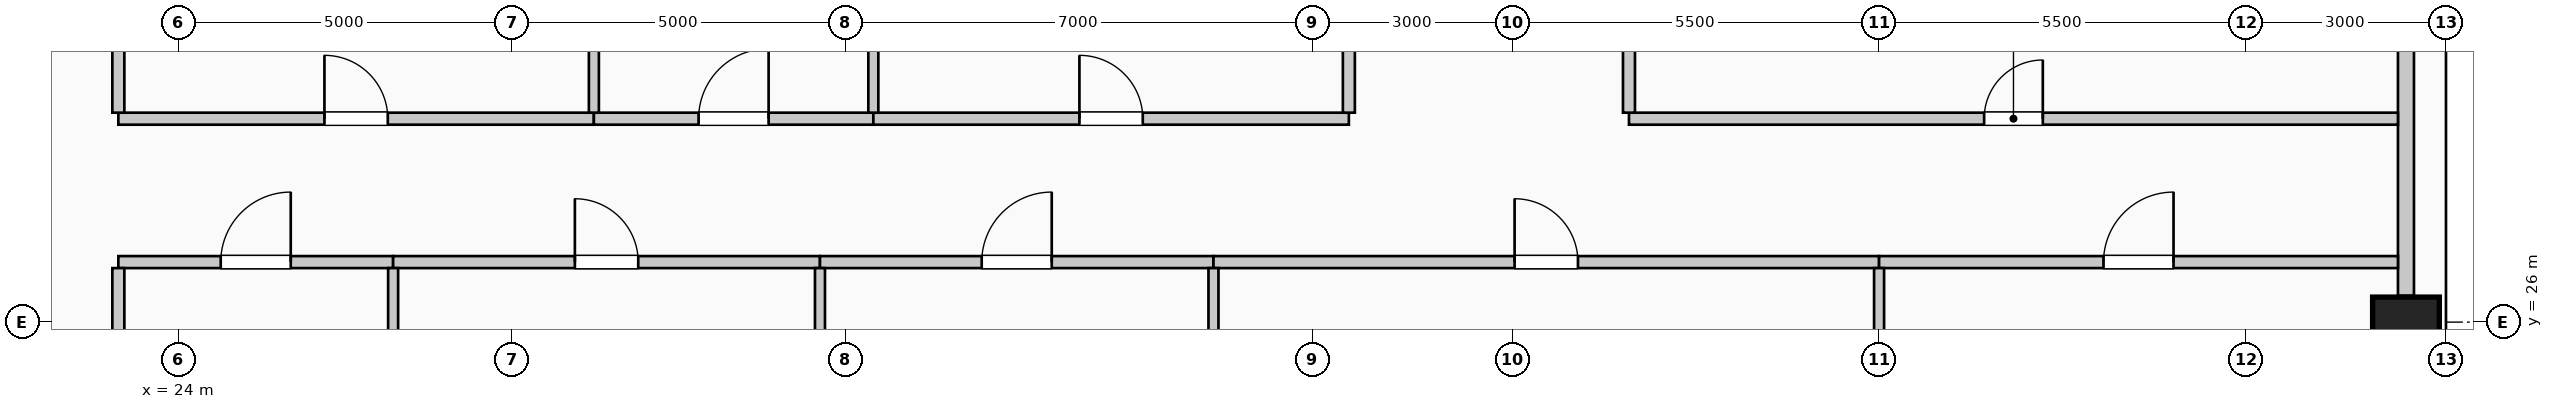
"""IFC4 building model, lengths in metres.
Left out: names, types, materials, properties, quantities, classifications, styles, units other than length and angle.
Written with IfcOpenShell. Run it as: python <this file> out.ifc"""

import sys

from ifc_helpers import new_model, si_unit, direction, frame, frame_2d, origin, origin_2d, place, context, subcontext, project, spatial, rectangle, extrude, element, fill, save


model = new_model("IFC4")
c1 = context("Model", 3, precision=1e-05, world=origin(), true_north=direction((0.0, 1.0)))
c2 = subcontext(c1, "Body", "Model", "MODEL_VIEW")
j1 = project(units=[si_unit("LENGTHUNIT", "METRE"), si_unit("PLANEANGLEUNIT", "RADIAN")], contexts=[c1])
p1 = place(None, origin())
s1 = spatial("IfcSite", under=j1, at=p1, CompositionType="ELEMENT")
p2 = place(p1, origin())
s2 = spatial("IfcBuilding", under=s1, at=p2, CompositionType="ELEMENT")
p3 = place(p2, frame((0.0, 0.0, 264.6)))
s3 = spatial("IfcBuildingStorey", under=s2, at=p3, CompositionType="ELEMENT", Elevation=264.6)
p4 = place(p3, frame((57.4, 26.0, 0.0), z_axis=(0.0, 0.0, 1.0), x_axis=(0.0, 1.0, 0.0)))
e1 = element("IfcColumn", 1, at=p4, inside=s3, PredefinedType="COLUMN", context=c2, shape_type="SweptSolid", body=[
    extrude(rectangle(XDim=0.75, YDim=1.0, at=origin_2d()), origin(), (0.0, 0.0, 1.0), 4.0),
])
p5 = place(p3, frame((57.4, 33.605, 0.0), z_axis=(0.0, 0.0, 1.0), x_axis=(0.0, -1.0, 0.0)))
e2 = element("IfcWall", 2, at=p5, inside=s3, PredefinedType="SOLIDWALL", context=c2, shape_type="SweptSolid", body=[
    extrude(rectangle(XDim=7.21, YDim=0.24, at=frame_2d((3.605, 0.0))), origin(), (0.0, 0.0, 1.0), 3.0),
])
p6 = place(p3, frame((23.1, 26.9, 0.0), z_axis=(0.0, 0.0, 1.0), x_axis=(1.0, 0.0, 0.0)))
e3 = element("IfcWall", 3, at=p6, inside=s3, PredefinedType="PARTITIONING", context=c2, shape_type="SweptSolid", body=[
    extrude(rectangle(XDim=4.12, YDim=0.18, at=frame_2d((2.06, 0.0))), origin(), (0.0, 0.0, 1.0), 3.75),
])
p7 = place(p6, frame((1.535, 0.0, 0.0)))
e4 = element("IfcOpeningElement", 4, at=p7, cuts=e3, PredefinedType="OPENING", context=c2, shape_type="SweptSolid", body=[
    extrude(rectangle(XDim=1.05, YDim=2.15, at=frame_2d((0.525, 1.075))), frame((0.0, 0.1, 0.0), z_axis=(0.0, -1.0, 0.0), x_axis=(1.0, 0.0, 0.0)), (0.0, 0.0, 1.0), 0.2),
])
p8 = place(p3, frame((27.22, 26.9, 0.0), z_axis=(0.0, 0.0, 1.0), x_axis=(1.0, 0.0, 0.0)))
e5 = element("IfcWall", 5, at=p8, inside=s3, PredefinedType="PARTITIONING", context=c2, shape_type="SweptSolid", body=[
    extrude(rectangle(XDim=6.4, YDim=0.18, at=frame_2d((3.2, 0.0))), origin(), (0.0, 0.0, 1.0), 3.75),
])
p9 = place(p8, frame((2.725, 0.0, 0.0)))
e6 = element("IfcOpeningElement", 6, at=p9, cuts=e5, PredefinedType="OPENING", context=c2, shape_type="SweptSolid", body=[
    extrude(rectangle(XDim=0.95, YDim=2.15, at=frame_2d((0.475, 1.075))), frame((0.0, 0.1, 0.0), z_axis=(0.0, -1.0, 0.0), x_axis=(1.0, 0.0, 0.0)), (0.0, 0.0, 1.0), 0.2),
])
p10 = place(p3, frame((33.62, 26.9, 0.0), z_axis=(0.0, 0.0, 1.0), x_axis=(1.0, 0.0, 0.0)))
e7 = element("IfcWall", 7, at=p10, inside=s3, PredefinedType="PARTITIONING", context=c2, shape_type="SweptSolid", body=[
    extrude(rectangle(XDim=5.9, YDim=0.18, at=frame_2d((2.95, 0.0))), origin(), (0.0, 0.0, 1.0), 3.75),
])
p11 = place(p10, frame((2.425, 0.0, 0.0)))
e8 = element("IfcOpeningElement", 8, at=p11, cuts=e7, PredefinedType="OPENING", context=c2, shape_type="SweptSolid", body=[
    extrude(rectangle(XDim=1.05, YDim=2.15, at=frame_2d((0.525, 1.075))), frame((0.0, 0.1, 0.0), z_axis=(0.0, -1.0, 0.0), x_axis=(1.0, 0.0, 0.0)), (0.0, 0.0, 1.0), 0.2),
])
p12 = place(p3, frame((39.52, 26.9, 0.0), z_axis=(0.0, 0.0, 1.0), x_axis=(1.0, 0.0, 0.0)))
e9 = element("IfcWall", 9, at=p12, inside=s3, PredefinedType="PARTITIONING", context=c2, shape_type="SweptSolid", body=[
    extrude(rectangle(XDim=9.98, YDim=0.18, at=frame_2d((4.99, 0.0))), origin(), (0.0, 0.0, 1.0), 3.75),
])
p13 = place(p12, frame((4.515, 0.0, 0.0)))
e10 = element("IfcOpeningElement", 10, at=p13, cuts=e9, PredefinedType="OPENING", context=c2, shape_type="SweptSolid", body=[
    extrude(rectangle(XDim=0.95, YDim=2.15, at=frame_2d((0.475, 1.075))), frame((0.0, 0.1, 0.0), z_axis=(0.0, -1.0, 0.0), x_axis=(1.0, 0.0, 0.0)), (0.0, 0.0, 1.0), 0.2),
])
p14 = place(p3, frame((49.5, 26.9, 0.0), z_axis=(0.0, 0.0, 1.0), x_axis=(1.0, 0.0, 0.0)))
e11 = element("IfcWall", 11, at=p14, inside=s3, PredefinedType="PARTITIONING", context=c2, shape_type="SweptSolid", body=[
    extrude(rectangle(XDim=7.78, YDim=0.18, at=frame_2d((3.89, 0.0))), origin(), (0.0, 0.0, 1.0), 3.75),
])
p15 = place(p14, frame((3.365, 0.0, 0.0)))
e12 = element("IfcOpeningElement", 12, at=p15, cuts=e11, PredefinedType="OPENING", context=c2, shape_type="SweptSolid", body=[
    extrude(rectangle(XDim=1.05, YDim=2.15, at=frame_2d((0.525, 1.075))), frame((0.0, 0.1, 0.0), z_axis=(0.0, -1.0, 0.0), x_axis=(1.0, 0.0, 0.0)), (0.0, 0.0, 1.0), 0.2),
])
p16 = place(p3, frame((23.1, 29.05, 0.0), z_axis=(0.0, 0.0, 1.0), x_axis=(1.0, 0.0, 0.0)))
e13 = element("IfcWall", 13, at=p16, inside=s3, PredefinedType="PARTITIONING", context=c2, shape_type="SweptSolid", body=[
    extrude(rectangle(XDim=7.13, YDim=0.18, at=frame_2d((3.565, 0.0))), origin(), (0.0, 0.0, 1.0), 3.75),
])
p17 = place(p16, frame((3.09, 0.0, 0.0)))
e14 = element("IfcOpeningElement", 14, at=p17, cuts=e13, PredefinedType="OPENING", context=c2, shape_type="SweptSolid", body=[
    extrude(rectangle(XDim=0.95, YDim=2.15, at=frame_2d((0.475, 1.075))), frame((0.0, 0.1, 0.0), z_axis=(0.0, -1.0, 0.0), x_axis=(1.0, 0.0, 0.0)), (0.0, 0.0, 1.0), 0.2),
])
p18 = place(p3, frame((30.23, 29.05, 0.0), z_axis=(0.0, 0.0, 1.0), x_axis=(1.0, 0.0, 0.0)))
e15 = element("IfcWall", 15, at=p18, inside=s3, PredefinedType="PARTITIONING", context=c2, shape_type="SweptSolid", body=[
    extrude(rectangle(XDim=4.19, YDim=0.18, at=frame_2d((2.095, 0.0))), origin(), (0.0, 0.0, 1.0), 3.75),
])
p19 = place(p18, frame((1.57, 0.0, 0.0)))
e16 = element("IfcOpeningElement", 16, at=p19, cuts=e15, PredefinedType="OPENING", context=c2, shape_type="SweptSolid", body=[
    extrude(rectangle(XDim=1.05, YDim=2.15, at=frame_2d((0.525, 1.075))), frame((0.0, 0.1, 0.0), z_axis=(0.0, -1.0, 0.0), x_axis=(1.0, 0.0, 0.0)), (0.0, 0.0, 1.0), 0.2),
])
p20 = place(p3, frame((34.42, 29.05, 0.0), z_axis=(0.0, 0.0, 1.0), x_axis=(1.0, 0.0, 0.0)))
e17 = element("IfcWall", 17, at=p20, inside=s3, PredefinedType="PARTITIONING", context=c2, shape_type="SweptSolid", body=[
    extrude(rectangle(XDim=7.13, YDim=0.18, at=frame_2d((3.565, 0.0))), origin(), (0.0, 0.0, 1.0), 3.75),
])
p21 = place(p20, frame((3.09, 0.0, 0.0)))
e18 = element("IfcOpeningElement", 18, at=p21, cuts=e17, PredefinedType="OPENING", context=c2, shape_type="SweptSolid", body=[
    extrude(rectangle(XDim=0.95, YDim=2.15, at=frame_2d((0.475, 1.075))), frame((0.0, 0.1, 0.0), z_axis=(0.0, -1.0, 0.0), x_axis=(1.0, 0.0, 0.0)), (0.0, 0.0, 1.0), 0.2),
])
p22 = place(p3, frame((45.75, 29.05, 0.0), z_axis=(0.0, 0.0, 1.0), x_axis=(1.0, 0.0, 0.0)))
e19 = element("IfcWall", 19, at=p22, inside=s3, PredefinedType="PARTITIONING", context=c2, shape_type="SweptSolid", body=[
    extrude(rectangle(XDim=11.53, YDim=0.18, at=frame_2d((5.765, 0.0))), origin(), (0.0, 0.0, 1.0), 3.75),
])
p23 = place(p22, frame((5.325, 0.0, 0.0)))
e20 = element("IfcOpeningElement", 20, at=p23, cuts=e19, PredefinedType="OPENING", context=c2, shape_type="SweptSolid", body=[
    extrude(rectangle(XDim=0.88, YDim=2.1, at=frame_2d((0.44, 1.05))), frame((0.0, 0.1, 0.0), z_axis=(0.0, -1.0, 0.0), x_axis=(1.0, 0.0, 0.0)), (0.0, 0.0, 1.0), 0.2),
])
p24 = place(p3, frame((23.1, 17.3, 0.0), z_axis=(0.0, 0.0, 1.0), x_axis=(0.0, 1.0, 0.0)))
e21 = element("IfcWall", 21, at=p24, inside=s3, PredefinedType="PARTITIONING", context=c2, shape_type="SweptSolid", body=[
    extrude(rectangle(XDim=9.51, YDim=0.18, at=frame_2d((4.755, 0.0))), origin(), (0.0, 0.0, 1.0), 3.75),
])
p25 = place(p3, frame((23.1, 29.14, 0.0), z_axis=(0.0, 0.0, 1.0), x_axis=(0.0, 1.0, 0.0)))
e22 = element("IfcWall", 22, at=p25, inside=s3, PredefinedType="PARTITIONING", context=c2, shape_type="SweptSolid", body=[
    extrude(rectangle(XDim=3.12, YDim=0.18, at=frame_2d((1.56, 0.0))), origin(), (0.0, 0.0, 1.0), 3.75),
])
p26 = place(p3, frame((27.22, 0.72, 0.0), z_axis=(0.0, 0.0, 1.0), x_axis=(0.0, 1.0, 0.0)))
e23 = element("IfcWall", 23, at=p26, inside=s3, PredefinedType="PARTITIONING", context=c2, shape_type="SweptSolid", body=[
    extrude(rectangle(XDim=26.09, YDim=0.15, at=frame_2d((13.045, 0.0))), origin(), (0.0, 0.0, 1.0), 3.75),
])
p27 = place(p3, frame((30.23, 29.14, 0.0), z_axis=(0.0, 0.0, 1.0), x_axis=(0.0, 1.0, 0.0)))
e24 = element("IfcWall", 24, at=p27, inside=s3, PredefinedType="PARTITIONING", context=c2, shape_type="SweptSolid", body=[
    extrude(rectangle(XDim=16.14, YDim=0.15, at=frame_2d((8.07, 0.0))), origin(), (0.0, 0.0, 1.0), 3.75),
])
p28 = place(p3, frame((33.62, 18.425, 0.0), z_axis=(0.0, 0.0, 1.0), x_axis=(0.0, 1.0, 0.0)))
e25 = element("IfcWall", 25, at=p28, inside=s3, PredefinedType="PARTITIONING", context=c2, shape_type="SweptSolid", body=[
    extrude(rectangle(XDim=8.385, YDim=0.15, at=frame_2d((4.192, 0.0))), origin(), (0.0, 0.0, 1.0), 3.75),
])
p29 = place(p3, frame((34.42, 29.14, 0.0), z_axis=(0.0, 0.0, 1.0), x_axis=(0.0, 1.0, 0.0)))
e26 = element("IfcWall", 26, at=p29, inside=s3, PredefinedType="PARTITIONING", context=c2, shape_type="SweptSolid", body=[
    extrude(rectangle(XDim=4.435, YDim=0.15, at=frame_2d((2.218, 0.0))), origin(), (0.0, 0.0, 1.0), 3.75),
])
p30 = place(p3, frame((39.52, 0.72, 0.0), z_axis=(0.0, 0.0, 1.0), x_axis=(0.0, 1.0, 0.0)))
e27 = element("IfcWall", 27, at=p30, inside=s3, PredefinedType="PARTITIONING", context=c2, shape_type="SweptSolid", body=[
    extrude(rectangle(XDim=26.09, YDim=0.15, at=frame_2d((13.045, 0.0))), origin(), (0.0, 0.0, 1.0), 3.75),
])
p31 = place(p3, frame((41.55, 29.14, 0.0), z_axis=(0.0, 0.0, 1.0), x_axis=(0.0, 1.0, 0.0)))
e28 = element("IfcWall", 28, at=p31, inside=s3, PredefinedType="PARTITIONING", context=c2, shape_type="SweptSolid", body=[
    extrude(rectangle(XDim=3.21, YDim=0.18, at=frame_2d((1.605, 0.0))), origin(), (0.0, 0.0, 1.0), 3.195),
])
p32 = place(p3, frame((45.75, 29.14, 0.0), z_axis=(0.0, 0.0, 1.0), x_axis=(0.0, 1.0, 0.0)))
e29 = element("IfcWall", 29, at=p32, inside=s3, PredefinedType="PARTITIONING", context=c2, shape_type="SweptSolid", body=[
    extrude(rectangle(XDim=3.135, YDim=0.18, at=frame_2d((1.567, 0.0))), origin(), (0.0, 0.0, 1.0), 3.75),
])
p33 = place(p3, frame((49.5, 1.1, 0.0), z_axis=(0.0, 0.0, 1.0), x_axis=(0.0, 1.0, 0.0)))
e30 = element("IfcWall", 30, at=p33, inside=s3, PredefinedType="PARTITIONING", context=c2, shape_type="SweptSolid", body=[
    extrude(rectangle(XDim=25.71, YDim=0.15, at=frame_2d((12.855, 0.0))), origin(), (0.0, 0.0, 1.0), 3.75),
])
p34 = place(p7, origin())
e31 = element("IfcDoor", 31, at=p34, inside=s3, OperationType="SINGLE_SWING_RIGHT", PredefinedType="DOOR", context=c2, shape_type="SweptSolid", body=[
    extrude(rectangle(XDim=1.05, YDim=2.15, at=frame_2d((0.525, 1.075))), frame((0.0, 0.025, 0.0), z_axis=(0.0, -1.0, 0.0), x_axis=(1.0, 0.0, 0.0)), (0.0, 0.0, 1.0), 0.05),
])
fill(e4, e31)
p35 = place(p9, origin())
e32 = element("IfcDoor", 32, at=p35, inside=s3, OperationType="SINGLE_SWING_LEFT", PredefinedType="DOOR", context=c2, shape_type="SweptSolid", body=[
    extrude(rectangle(XDim=0.95, YDim=2.15, at=frame_2d((0.475, 1.075))), frame((0.0, 0.025, 0.0), z_axis=(0.0, -1.0, 0.0), x_axis=(1.0, 0.0, 0.0)), (0.0, 0.0, 1.0), 0.05),
])
fill(e6, e32)
p36 = place(p11, origin())
e33 = element("IfcDoor", 33, at=p36, inside=s3, OperationType="SINGLE_SWING_RIGHT", PredefinedType="DOOR", context=c2, shape_type="SweptSolid", body=[
    extrude(rectangle(XDim=1.05, YDim=2.15, at=frame_2d((0.525, 1.075))), frame((0.0, 0.025, 0.0), z_axis=(0.0, -1.0, 0.0), x_axis=(1.0, 0.0, 0.0)), (0.0, 0.0, 1.0), 0.05),
])
fill(e8, e33)
p37 = place(p13, origin())
e34 = element("IfcDoor", 34, at=p37, inside=s3, OperationType="SINGLE_SWING_LEFT", PredefinedType="DOOR", context=c2, shape_type="SweptSolid", body=[
    extrude(rectangle(XDim=0.95, YDim=2.15, at=frame_2d((0.475, 1.075))), frame((0.0, 0.025, 0.0), z_axis=(0.0, -1.0, 0.0), x_axis=(1.0, 0.0, 0.0)), (0.0, 0.0, 1.0), 0.05),
])
fill(e10, e34)
p38 = place(p15, origin())
e35 = element("IfcDoor", 35, at=p38, inside=s3, OperationType="SINGLE_SWING_RIGHT", PredefinedType="DOOR", context=c2, shape_type="SweptSolid", body=[
    extrude(rectangle(XDim=1.05, YDim=2.15, at=frame_2d((0.525, 1.075))), frame((0.0, 0.025, 0.0), z_axis=(0.0, -1.0, 0.0), x_axis=(1.0, 0.0, 0.0)), (0.0, 0.0, 1.0), 0.05),
])
fill(e12, e35)
p39 = place(p17, origin())
e36 = element("IfcDoor", 36, at=p39, inside=s3, OperationType="SINGLE_SWING_LEFT", PredefinedType="DOOR", context=c2, shape_type="SweptSolid", body=[
    extrude(rectangle(XDim=0.95, YDim=2.15, at=frame_2d((0.475, 1.075))), frame((0.0, 0.025, 0.0), z_axis=(0.0, -1.0, 0.0), x_axis=(1.0, 0.0, 0.0)), (0.0, 0.0, 1.0), 0.05),
])
fill(e14, e36)
p40 = place(p19, origin())
e37 = element("IfcDoor", 37, at=p40, inside=s3, OperationType="SINGLE_SWING_RIGHT", PredefinedType="DOOR", context=c2, shape_type="SweptSolid", body=[
    extrude(rectangle(XDim=1.05, YDim=2.15, at=frame_2d((0.525, 1.075))), frame((0.0, 0.025, 0.0), z_axis=(0.0, -1.0, 0.0), x_axis=(1.0, 0.0, 0.0)), (0.0, 0.0, 1.0), 0.05),
])
fill(e16, e37)
p41 = place(p21, origin())
e38 = element("IfcDoor", 38, at=p41, inside=s3, OperationType="SINGLE_SWING_LEFT", PredefinedType="DOOR", context=c2, shape_type="SweptSolid", body=[
    extrude(rectangle(XDim=0.95, YDim=2.15, at=frame_2d((0.475, 1.075))), frame((0.0, 0.025, 0.0), z_axis=(0.0, -1.0, 0.0), x_axis=(1.0, 0.0, 0.0)), (0.0, 0.0, 1.0), 0.05),
])
fill(e18, e38)
p42 = place(p23, origin())
e39 = element("IfcDoor", 39, at=p42, inside=s3, OperationType="SINGLE_SWING_RIGHT", PredefinedType="DOOR", context=c2, shape_type="SweptSolid", body=[
    extrude(rectangle(XDim=0.88, YDim=2.1, at=frame_2d((0.44, 1.05))), frame((0.0, 0.025, 0.0), z_axis=(0.0, -1.0, 0.0), x_axis=(1.0, 0.0, 0.0)), (0.0, 0.0, 1.0), 0.05),
])
fill(e20, e39)
save(model, sys.argv[1])
